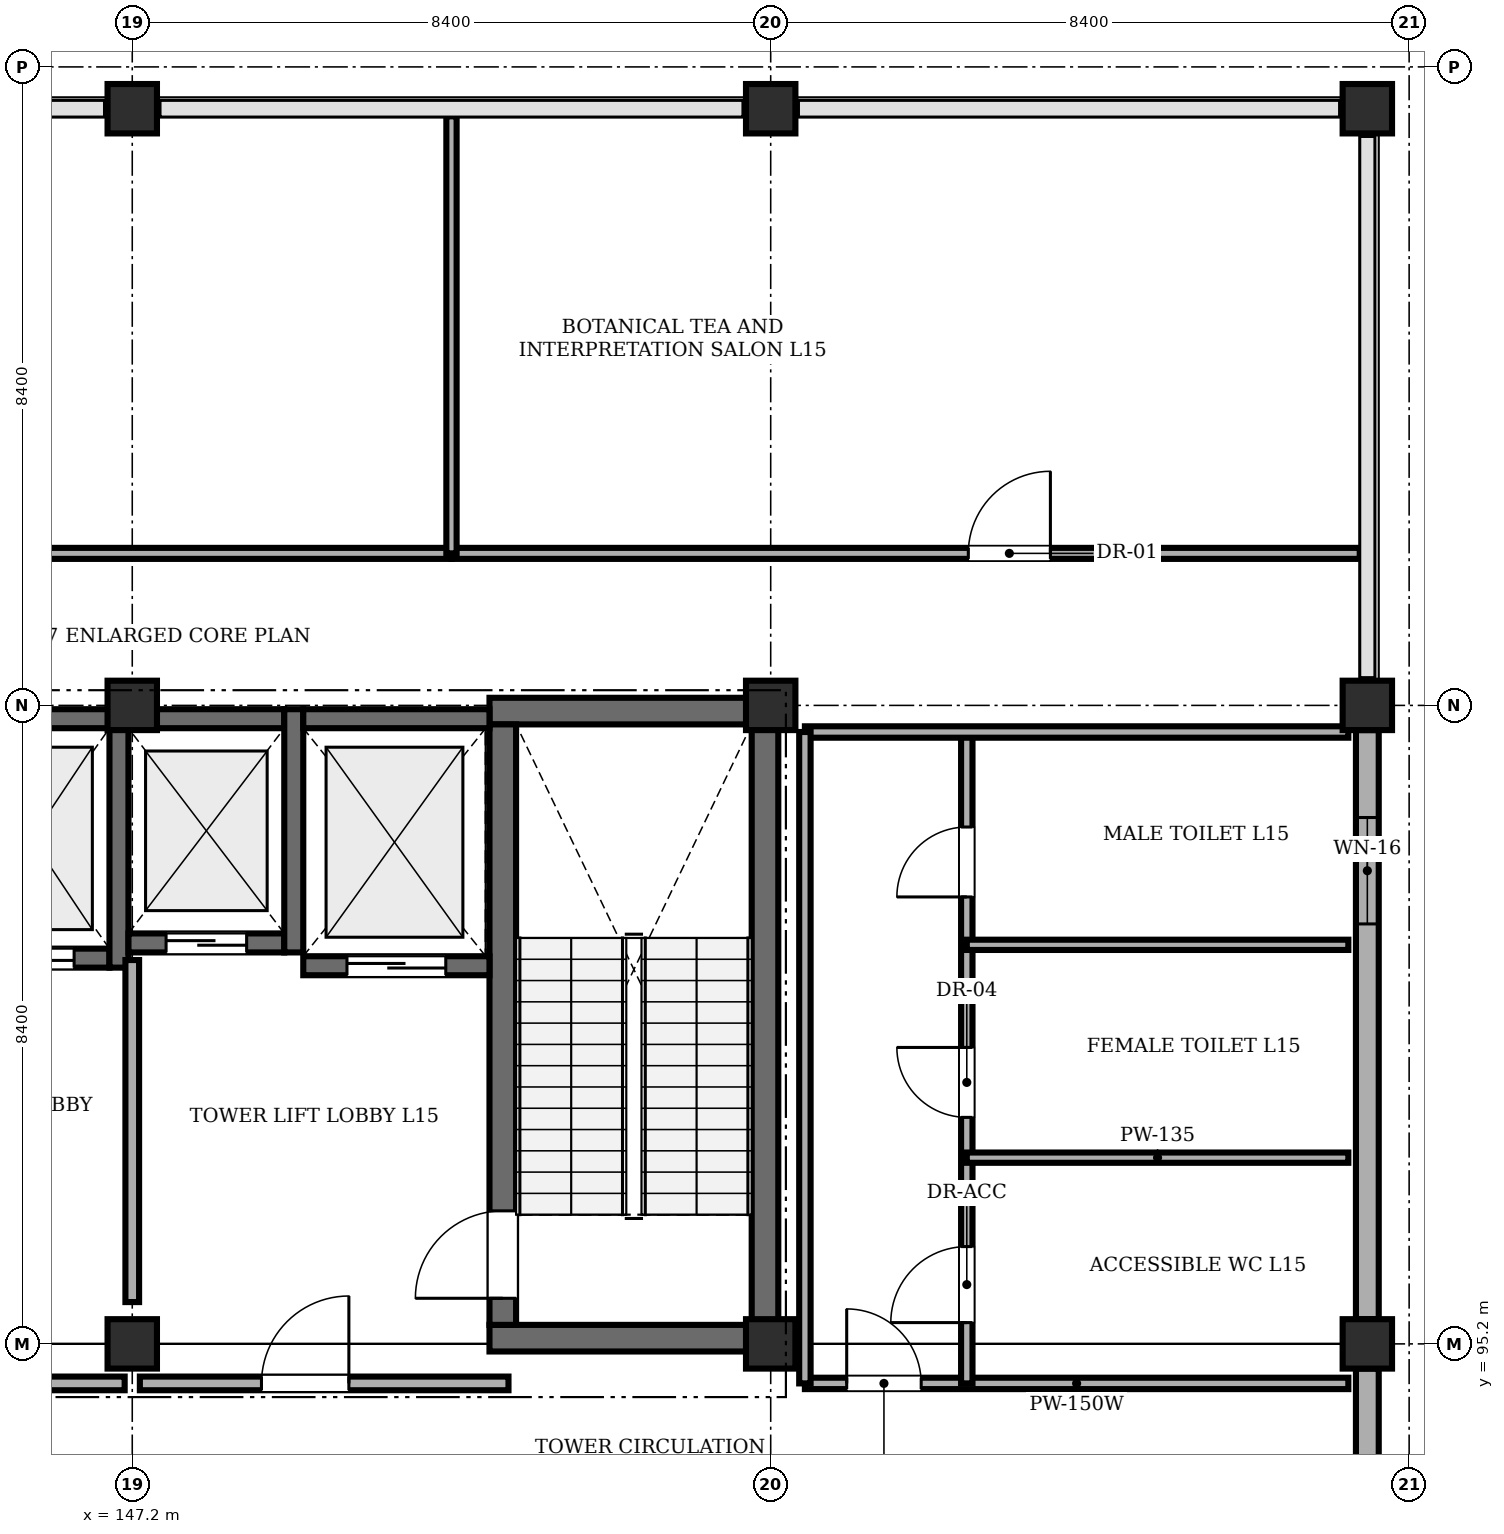
"""IFC4 building model, lengths in metres.
Left out: names, types, materials, properties, quantities, classifications, styles, units other than length and angle.
Written with IfcOpenShell. Run it as: python <this file> out.ifc"""

import sys

from ifc_helpers import new_model, si_unit, direction, frame, frame_2d, origin, origin_2d, place, context, subcontext, project, spatial, rectangle, extrude, element, fill, save


model = new_model("IFC4")
c1 = context("Model", 3, precision=1e-05, world=origin(), true_north=direction((0.0, 1.0)))
c2 = subcontext(c1, "Body", "Model", "MODEL_VIEW")
j1 = project(units=[si_unit("LENGTHUNIT", "METRE"), si_unit("PLANEANGLEUNIT", "RADIAN")], contexts=[c1])
p1 = place(None, origin())
s1 = spatial("IfcSite", under=j1, at=p1, CompositionType="ELEMENT")
p2 = place(p1, origin())
s2 = spatial("IfcBuilding", under=s1, at=p2, CompositionType="ELEMENT")
p3 = place(p2, frame((0.0, 0.0, 61.2)))
s3 = spatial("IfcBuildingStorey", under=s2, at=p3, CompositionType="ELEMENT", Elevation=61.2)
for number, where, z_axis, x_axis in (
    (1, (147.2, 95.2, 0.0), (0.0, 0.0, 1.0), (1.0, 0.0, 0.0)),
    (2, (147.2, 103.6, 0.0), (0.0, 0.0, 1.0), (1.0, 0.0, 0.0)),
    (3, (147.2, 111.45, 0.0), (0.0, 0.0, 1.0), (1.0, 0.0, 0.0)),
    (4, (155.6, 95.2, 0.0), (0.0, 0.0, 1.0), (1.0, 0.0, 0.0)),
    (5, (155.6, 103.6, 0.0), (0.0, 0.0, 1.0), (1.0, 0.0, 0.0)),
    (6, (155.6, 111.45, 0.0), (0.0, 0.0, 1.0), (1.0, 0.0, 0.0)),
    (7, (163.45, 95.2, 0.0), (0.0, 0.0, 1.0), (1.0, 0.0, 0.0)),
    (8, (163.45, 103.6, 0.0), (0.0, 0.0, 1.0), (1.0, 0.0, 0.0)),
    (9, (163.45, 111.45, 0.0), (0.0, 0.0, 1.0), (1.0, 0.0, 0.0)),
):
    element("IfcColumn", number, at=place(p3, frame(where, z_axis=z_axis, x_axis=x_axis)), inside=s3, PredefinedType="COLUMN", context=c2, shape_type="SweptSolid", body=[
        extrude(rectangle(XDim=0.65, YDim=0.65, at=origin_2d()), origin(), (0.0, 0.0, 1.0), 4.28),
    ])
for number, where, z_axis, x_axis in (
    (10, (151.9, 95.275, 0.0), (0.0, 0.0, 1.0), (1.0, 0.0, 0.0)),
    (11, (151.9, 103.525, 0.0), (0.0, 0.0, 1.0), (1.0, 0.0, 0.0)),
):
    element("IfcWall", number, at=place(p3, frame(where, z_axis=z_axis, x_axis=x_axis)), inside=s3, PredefinedType="SHEAR", context=c2, shape_type="SweptSolid", body=[
        extrude(rectangle(XDim=3.8, YDim=0.35, at=frame_2d((1.9, 0.0))), origin(), (0.0, 0.0, 1.0), 4.28),
    ])
p4 = place(p3, frame((152.075, 95.45, 0.0), z_axis=(0.0, 0.0, 1.0), x_axis=(0.0, 1.0, 0.0)))
e12 = element("IfcWall", 12, at=p4, inside=s3, PredefinedType="SHEAR", context=c2, shape_type="SweptSolid", body=[
    extrude(rectangle(XDim=7.9, YDim=0.35, at=frame_2d((3.95, 0.0))), origin(), (0.0, 0.0, 1.0), 4.28),
])
p5 = place(p4, frame((0.35, 0.0, 0.0)))
e13 = element("IfcOpeningElement", 13, at=p5, cuts=e12, PredefinedType="OPENING", context=c2, shape_type="SweptSolid", body=[
    extrude(rectangle(XDim=1.15, YDim=2.15, at=frame_2d((0.575, 1.075))), frame((0.0, 0.185, 0.0), z_axis=(0.0, -1.0, 0.0), x_axis=(1.0, 0.0, 0.0)), (0.0, 0.0, 1.0), 0.37),
])
p6 = place(p3, frame((155.525, 95.45, 0.0), z_axis=(0.0, 0.0, 1.0), x_axis=(0.0, 1.0, 0.0)))
e14 = element("IfcWall", 14, at=p6, inside=s3, PredefinedType="SHEAR", context=c2, shape_type="SweptSolid", body=[
    extrude(rectangle(XDim=7.9, YDim=0.35, at=frame_2d((3.95, 0.0))), origin(), (0.0, 0.0, 1.0), 4.28),
])
p7 = place(p3, frame((144.85, 100.275, 0.0), z_axis=(0.0, 0.0, 1.0), x_axis=(1.0, 0.0, 0.0)))
e15 = element("IfcWall", 15, at=p7, inside=s3, PredefinedType="SHEAR", context=c2, shape_type="SweptSolid", body=[
    extrude(rectangle(XDim=2.05, YDim=0.25, at=frame_2d((1.025, 0.0))), origin(), (0.0, 0.0, 1.0), 4.28),
])
p8 = place(p7, frame((0.465, 0.0, 0.0)))
e16 = element("IfcOpeningElement", 16, at=p8, cuts=e15, PredefinedType="OPENING", context=c2, shape_type="SweptSolid", body=[
    extrude(rectangle(XDim=1.12, YDim=2.15, at=frame_2d((0.56, 1.075))), frame((0.0, 0.135, 0.0), z_axis=(0.0, -1.0, 0.0), x_axis=(1.0, 0.0, 0.0)), (0.0, 0.0, 1.0), 0.27),
])
p9 = place(p3, frame((144.85, 103.425, 0.0), z_axis=(0.0, 0.0, 1.0), x_axis=(1.0, 0.0, 0.0)))
e17 = element("IfcWall", 17, at=p9, inside=s3, PredefinedType="SHEAR", context=c2, shape_type="SweptSolid", body=[
    extrude(rectangle(XDim=2.05, YDim=0.25, at=frame_2d((1.025, 0.0))), origin(), (0.0, 0.0, 1.0), 4.28),
])
p10 = place(p3, frame((147.025, 100.15, 0.0), z_axis=(0.0, 0.0, 1.0), x_axis=(0.0, 1.0, 0.0)))
e18 = element("IfcWall", 18, at=p10, inside=s3, PredefinedType="SHEAR", context=c2, shape_type="SweptSolid", body=[
    extrude(rectangle(XDim=3.4, YDim=0.25, at=frame_2d((1.7, 0.0))), origin(), (0.0, 0.0, 1.0), 4.28),
])
p11 = place(p3, frame((147.15, 100.475, 0.0), z_axis=(0.0, 0.0, 1.0), x_axis=(1.0, 0.0, 0.0)))
e19 = element("IfcWall", 19, at=p11, inside=s3, PredefinedType="SHEAR", context=c2, shape_type="SweptSolid", body=[
    extrude(rectangle(XDim=2.05, YDim=0.25, at=frame_2d((1.025, 0.0))), origin(), (0.0, 0.0, 1.0), 4.28),
])
p12 = place(p11, frame((0.495, 0.0, 0.0)))
e20 = element("IfcOpeningElement", 20, at=p12, cuts=e19, PredefinedType="OPENING", context=c2, shape_type="SweptSolid", body=[
    extrude(rectangle(XDim=1.06, YDim=2.15, at=frame_2d((0.53, 1.075))), frame((0.0, 0.135, 0.0), z_axis=(0.0, -1.0, 0.0), x_axis=(1.0, 0.0, 0.0)), (0.0, 0.0, 1.0), 0.27),
])
p13 = place(p3, frame((147.15, 103.425, 0.0), z_axis=(0.0, 0.0, 1.0), x_axis=(1.0, 0.0, 0.0)))
e21 = element("IfcWall", 21, at=p13, inside=s3, PredefinedType="SHEAR", context=c2, shape_type="SweptSolid", body=[
    extrude(rectangle(XDim=2.05, YDim=0.25, at=frame_2d((1.025, 0.0))), origin(), (0.0, 0.0, 1.0), 4.28),
])
p14 = place(p3, frame((149.325, 100.35, 0.0), z_axis=(0.0, 0.0, 1.0), x_axis=(0.0, 1.0, 0.0)))
e22 = element("IfcWall", 22, at=p14, inside=s3, PredefinedType="SHEAR", context=c2, shape_type="SweptSolid", body=[
    extrude(rectangle(XDim=3.2, YDim=0.25, at=frame_2d((1.6, 0.0))), origin(), (0.0, 0.0, 1.0), 4.28),
])
p15 = place(p3, frame((149.45, 100.175, 0.0), z_axis=(0.0, 0.0, 1.0), x_axis=(1.0, 0.0, 0.0)))
e23 = element("IfcWall", 23, at=p15, inside=s3, PredefinedType="SHEAR", context=c2, shape_type="SweptSolid", body=[
    extrude(rectangle(XDim=2.45, YDim=0.25, at=frame_2d((1.225, 0.0))), origin(), (0.0, 0.0, 1.0), 4.28),
])
p16 = place(p15, frame((0.575, 0.0, 0.0)))
e24 = element("IfcOpeningElement", 24, at=p16, cuts=e23, PredefinedType="OPENING", context=c2, shape_type="SweptSolid", body=[
    extrude(rectangle(XDim=1.3, YDim=2.25, at=frame_2d((0.65, 1.125))), frame((0.0, 0.135, 0.0), z_axis=(0.0, -1.0, 0.0), x_axis=(1.0, 0.0, 0.0)), (0.0, 0.0, 1.0), 0.27),
])
p17 = place(p3, frame((149.45, 103.425, 0.0), z_axis=(0.0, 0.0, 1.0), x_axis=(1.0, 0.0, 0.0)))
e25 = element("IfcWall", 25, at=p17, inside=s3, PredefinedType="SHEAR", context=c2, shape_type="SweptSolid", body=[
    extrude(rectangle(XDim=2.45, YDim=0.25, at=frame_2d((1.225, 0.0))), origin(), (0.0, 0.0, 1.0), 4.28),
])
p18 = place(p3, frame((163.45, 94.875, 0.0), z_axis=(0.0, 0.0, 1.0), x_axis=(0.0, -1.0, 0.0)))
e26 = element("IfcWall", 26, at=p18, inside=s3, PredefinedType="STANDARD", context=c2, shape_type="SweptSolid", body=[
    extrude(rectangle(XDim=7.75, YDim=0.3, at=frame_2d((3.875, 0.0))), origin(), (0.0, 0.0, 1.0), 3.58),
])
p19 = place(p18, frame((4.2, 0.0, 1.1)))
e27 = element("IfcOpeningElement", 27, at=p19, cuts=e26, PredefinedType="OPENING", context=c2, shape_type="SweptSolid", body=[
    extrude(rectangle(XDim=1.8, YDim=1.8, at=frame_2d((0.9, 0.9))), frame((0.0, 0.16, 0.0), z_axis=(0.0, -1.0, 0.0), x_axis=(1.0, 0.0, 0.0)), (0.0, 0.0, 1.0), 0.32),
])
p20 = place(p3, frame((163.45, 103.275, 0.0), z_axis=(0.0, 0.0, 1.0), x_axis=(0.0, -1.0, 0.0)))
e28 = element("IfcWall", 28, at=p20, inside=s3, PredefinedType="STANDARD", context=c2, shape_type="SweptSolid", body=[
    extrude(rectangle(XDim=7.75, YDim=0.3, at=frame_2d((3.875, 0.0))), origin(), (0.0, 0.0, 1.0), 3.58),
])
p21 = place(p20, frame((1.15, 0.0, 1.1)))
e29 = element("IfcOpeningElement", 29, at=p21, cuts=e28, PredefinedType="OPENING", context=c2, shape_type="SweptSolid", body=[
    extrude(rectangle(XDim=1.4, YDim=1.4, at=frame_2d((0.7, 0.7))), frame((0.0, 0.16, 0.0), z_axis=(0.0, -1.0, 0.0), x_axis=(1.0, 0.0, 0.0)), (0.0, 0.0, 1.0), 0.32),
])
p22 = place(p3, frame((142.3, 94.68, 0.0), z_axis=(0.0, 0.0, 1.0), x_axis=(1.0, 0.0, 0.0)))
e30 = element("IfcWall", 30, at=p22, inside=s3, PredefinedType="STANDARD", context=c2, shape_type="SweptSolid", body=[
    extrude(rectangle(XDim=4.8, YDim=0.18, at=frame_2d((2.4, 0.0))), origin(), (0.0, 0.0, 1.0), 4.28),
])
p23 = place(p22, frame((1.6, 0.0, 0.0)))
e31 = element("IfcOpeningElement", 31, at=p23, cuts=e30, PredefinedType="OPENING", context=c2, shape_type="SweptSolid", body=[
    extrude(rectangle(XDim=1.15, YDim=2.15, at=frame_2d((0.575, 1.075))), frame((0.0, 0.1, 0.0), z_axis=(0.0, -1.0, 0.0), x_axis=(1.0, 0.0, 0.0)), (0.0, 0.0, 1.0), 0.2),
])
p24 = place(p3, frame((147.3, 94.68, 0.0), z_axis=(0.0, 0.0, 1.0), x_axis=(1.0, 0.0, 0.0)))
e32 = element("IfcWall", 32, at=p24, inside=s3, PredefinedType="STANDARD", context=c2, shape_type="SweptSolid", body=[
    extrude(rectangle(XDim=4.85, YDim=0.18, at=frame_2d((2.425, 0.0))), origin(), (0.0, 0.0, 1.0), 4.28),
])
p25 = place(p24, frame((1.6, 0.0, 0.0)))
e33 = element("IfcOpeningElement", 33, at=p25, cuts=e32, PredefinedType="OPENING", context=c2, shape_type="SweptSolid", body=[
    extrude(rectangle(XDim=1.15, YDim=2.15, at=frame_2d((0.575, 1.075))), frame((0.0, 0.1, 0.0), z_axis=(0.0, -1.0, 0.0), x_axis=(1.0, 0.0, 0.0)), (0.0, 0.0, 1.0), 0.2),
])
p26 = place(p3, frame((147.2, 95.75, 0.0), z_axis=(0.0, 0.0, 1.0), x_axis=(0.0, 1.0, 0.0)))
e34 = element("IfcWall", 34, at=p26, inside=s3, PredefinedType="STANDARD", context=c2, shape_type="SweptSolid", body=[
    extrude(rectangle(XDim=4.5, YDim=0.18, at=frame_2d((2.25, 0.0))), origin(), (0.0, 0.0, 1.0), 3.58),
])
p27 = place(p3, frame((156.05, 94.68, 0.0), z_axis=(0.0, 0.0, 1.0), x_axis=(1.0, 0.0, 0.0)))
e35 = element("IfcWall", 35, at=p27, inside=s3, PredefinedType="PARTITIONING", context=c2, shape_type="SweptSolid", body=[
    extrude(rectangle(XDim=7.15, YDim=0.15, at=frame_2d((3.575, 0.0))), origin(), (0.0, 0.0, 1.0), 4.28),
])
p28 = place(p27, frame((0.55, 0.0, 0.0)))
e36 = element("IfcOpeningElement", 36, at=p28, cuts=e35, PredefinedType="OPENING", context=c2, shape_type="SweptSolid", body=[
    extrude(rectangle(XDim=0.98, YDim=2.12, at=frame_2d((0.49, 1.06))), frame((0.0, 0.085, 0.0), z_axis=(0.0, -1.0, 0.0), x_axis=(1.0, 0.0, 0.0)), (0.0, 0.0, 1.0), 0.17),
])
p29 = place(p3, frame((158.18, 94.68, 0.0), z_axis=(0.0, 0.0, 1.0), x_axis=(0.0, 1.0, 0.0)))
e37 = element("IfcWall", 37, at=p29, inside=s3, PredefinedType="PARTITIONING", context=c2, shape_type="SweptSolid", body=[
    extrude(rectangle(XDim=8.57, YDim=0.15, at=frame_2d((4.285, 0.0))), origin(), (0.0, 0.0, 1.0), 4.28),
])
p30 = place(p29, frame((0.8, 0.0, 0.0)))
e38 = element("IfcOpeningElement", 38, at=p30, cuts=e37, PredefinedType="OPENING", context=c2, shape_type="SweptSolid", body=[
    extrude(rectangle(XDim=1.0, YDim=2.12, at=frame_2d((0.5, 1.06))), frame((0.0, 0.085, 0.0), z_axis=(0.0, -1.0, 0.0), x_axis=(1.0, 0.0, 0.0)), (0.0, 0.0, 1.0), 0.17),
])
p31 = place(p29, frame((3.5, 0.0, 0.0)))
e39 = element("IfcOpeningElement", 39, at=p31, cuts=e37, PredefinedType="OPENING", context=c2, shape_type="SweptSolid", body=[
    extrude(rectangle(XDim=0.92, YDim=2.1, at=frame_2d((0.46, 1.05))), frame((0.0, 0.085, 0.0), z_axis=(0.0, -1.0, 0.0), x_axis=(1.0, 0.0, 0.0)), (0.0, 0.0, 1.0), 0.17),
])
p32 = place(p29, frame((6.4, 0.0, 0.0)))
e40 = element("IfcOpeningElement", 40, at=p32, cuts=e37, PredefinedType="OPENING", context=c2, shape_type="SweptSolid", body=[
    extrude(rectangle(XDim=0.92, YDim=2.1, at=frame_2d((0.46, 1.05))), frame((0.0, 0.085, 0.0), z_axis=(0.0, -1.0, 0.0), x_axis=(1.0, 0.0, 0.0)), (0.0, 0.0, 1.0), 0.17),
])
for number, where, z_axis, x_axis in (
    (41, (158.18, 97.65, 0.0), (0.0, 0.0, 1.0), (1.0, 0.0, 0.0)),
    (42, (158.18, 100.45, 0.0), (0.0, 0.0, 1.0), (1.0, 0.0, 0.0)),
):
    element("IfcWall", number, at=place(p3, frame(where, z_axis=z_axis, x_axis=x_axis)), inside=s3, PredefinedType="PARTITIONING", context=c2, shape_type="SweptSolid", body=[
        extrude(rectangle(XDim=5.02, YDim=0.135, at=frame_2d((2.51, 0.0))), origin(), (0.0, 0.0, 1.0), 4.28),
    ])
p33 = place(p3, frame((156.05, 103.25, 0.0), z_axis=(0.0, 0.0, 1.0), x_axis=(1.0, 0.0, 0.0)))
e43 = element("IfcWall", 43, at=p33, inside=s3, PredefinedType="PARTITIONING", context=c2, shape_type="SweptSolid", body=[
    extrude(rectangle(XDim=7.15, YDim=0.15, at=frame_2d((3.575, 0.0))), origin(), (0.0, 0.0, 1.0), 4.28),
])
p34 = place(p3, frame((156.05, 94.68, 0.0), z_axis=(0.0, 0.0, 1.0), x_axis=(0.0, 1.0, 0.0)))
e44 = element("IfcWall", 44, at=p34, inside=s3, PredefinedType="PARTITIONING", context=c2, shape_type="SweptSolid", body=[
    extrude(rectangle(XDim=8.57, YDim=0.15, at=frame_2d((4.285, 0.0))), origin(), (0.0, 0.0, 1.0), 4.28),
])
p35 = place(p3, frame((122.15, 105.6, 0.0), z_axis=(0.0, 0.0, 1.0), x_axis=(1.0, 0.0, 0.0)))
e45 = element("IfcWall", 45, at=p35, inside=s3, PredefinedType="PARTITIONING", context=c2, shape_type="SweptSolid", body=[
    extrude(rectangle(XDim=29.25, YDim=0.145, at=frame_2d((14.625, 0.0))), origin(), (0.0, 0.0, 1.0), 4.28),
])
p36 = place(p35, frame((3.75, 0.0, 0.0)))
e46 = element("IfcOpeningElement", 46, at=p36, cuts=e45, PredefinedType="OPENING", context=c2, shape_type="SweptSolid", body=[
    extrude(rectangle(XDim=1.92, YDim=2.28, at=frame_2d((0.96, 1.14))), frame((0.0, 0.083, 0.0), z_axis=(0.0, -1.0, 0.0), x_axis=(1.0, 0.0, 0.0)), (0.0, 0.0, 1.0), 0.165),
])
p37 = place(p3, frame((151.4, 105.6, 0.0), z_axis=(0.0, 0.0, 1.0), x_axis=(1.0, 0.0, 0.0)))
e47 = element("IfcWall", 47, at=p37, inside=s3, PredefinedType="PARTITIONING", context=c2, shape_type="SweptSolid", body=[
    extrude(rectangle(XDim=11.95, YDim=0.145, at=frame_2d((5.975, 0.0))), origin(), (0.0, 0.0, 1.0), 4.28),
])
p38 = place(p37, frame((6.8, 0.0, 0.0)))
e48 = element("IfcOpeningElement", 48, at=p38, cuts=e47, PredefinedType="OPENING", context=c2, shape_type="SweptSolid", body=[
    extrude(rectangle(XDim=1.08, YDim=2.15, at=frame_2d((0.54, 1.075))), frame((0.0, 0.083, 0.0), z_axis=(0.0, -1.0, 0.0), x_axis=(1.0, 0.0, 0.0)), (0.0, 0.0, 1.0), 0.165),
])
p39 = place(p3, frame((151.4, 105.6, 0.0), z_axis=(0.0, 0.0, 1.0), x_axis=(0.0, 1.0, 0.0)))
e49 = element("IfcWall", 49, at=p39, inside=s3, PredefinedType="PARTITIONING", context=c2, shape_type="SweptSolid", body=[
    extrude(rectangle(XDim=5.75, YDim=0.135, at=frame_2d((2.875, 0.0))), origin(), (0.0, 0.0, 1.0), 3.83),
])
p40 = place(p21, origin())
e50 = element("IfcWindow", 50, at=p40, inside=s3, PartitioningType="SINGLE_PANEL", PredefinedType="WINDOW", context=c2, shape_type="SweptSolid", body=[
    extrude(rectangle(XDim=1.4, YDim=1.4, at=frame_2d((0.7, 0.7))), frame((0.0, 0.03, 0.0), z_axis=(0.0, -1.0, 0.0), x_axis=(1.0, 0.0, 0.0)), (0.0, 0.0, 1.0), 0.06),
])
fill(e29, e50)
p41 = place(p25, origin())
e51 = element("IfcDoor", 51, at=p41, inside=s3, OperationType="SINGLE_SWING_RIGHT", PredefinedType="DOOR", context=c2, shape_type="SweptSolid", body=[
    extrude(rectangle(XDim=1.15, YDim=2.15, at=frame_2d((0.575, 1.075))), frame((0.0, 0.025, 0.0), z_axis=(0.0, -1.0, 0.0), x_axis=(1.0, 0.0, 0.0)), (0.0, 0.0, 1.0), 0.05),
])
fill(e33, e51)
p42 = place(p28, origin())
e52 = element("IfcDoor", 52, at=p42, inside=s3, OperationType="SINGLE_SWING_LEFT", PredefinedType="DOOR", context=c2, shape_type="SweptSolid", body=[
    extrude(rectangle(XDim=0.98, YDim=2.12, at=frame_2d((0.49, 1.06))), frame((0.0, 0.025, 0.0), z_axis=(0.0, -1.0, 0.0), x_axis=(1.0, 0.0, 0.0)), (0.0, 0.0, 1.0), 0.05),
])
fill(e36, e52)
p43 = place(p30, origin())
e53 = element("IfcDoor", 53, at=p43, inside=s3, OperationType="SINGLE_SWING_LEFT", PredefinedType="DOOR", context=c2, shape_type="SweptSolid", body=[
    extrude(rectangle(XDim=1.0, YDim=2.12, at=frame_2d((0.5, 1.06))), frame((0.0, 0.025, 0.0), z_axis=(0.0, -1.0, 0.0), x_axis=(1.0, 0.0, 0.0)), (0.0, 0.0, 1.0), 0.05),
])
fill(e38, e53)
p44 = place(p31, origin())
e54 = element("IfcDoor", 54, at=p44, inside=s3, OperationType="SINGLE_SWING_RIGHT", PredefinedType="DOOR", context=c2, shape_type="SweptSolid", body=[
    extrude(rectangle(XDim=0.92, YDim=2.1, at=frame_2d((0.46, 1.05))), frame((0.0, 0.025, 0.0), z_axis=(0.0, -1.0, 0.0), x_axis=(1.0, 0.0, 0.0)), (0.0, 0.0, 1.0), 0.05),
])
fill(e39, e54)
p45 = place(p32, origin())
e55 = element("IfcDoor", 55, at=p45, inside=s3, OperationType="SINGLE_SWING_LEFT", PredefinedType="DOOR", context=c2, shape_type="SweptSolid", body=[
    extrude(rectangle(XDim=0.92, YDim=2.1, at=frame_2d((0.46, 1.05))), frame((0.0, 0.025, 0.0), z_axis=(0.0, -1.0, 0.0), x_axis=(1.0, 0.0, 0.0)), (0.0, 0.0, 1.0), 0.05),
])
fill(e40, e55)
p46 = place(p38, origin())
e56 = element("IfcDoor", 56, at=p46, inside=s3, OperationType="SINGLE_SWING_RIGHT", PredefinedType="DOOR", context=c2, shape_type="SweptSolid", body=[
    extrude(rectangle(XDim=1.08, YDim=2.15, at=frame_2d((0.54, 1.075))), frame((0.0, 0.025, 0.0), z_axis=(0.0, -1.0, 0.0), x_axis=(1.0, 0.0, 0.0)), (0.0, 0.0, 1.0), 0.05),
])
fill(e48, e56)
p47 = place(p5, origin())
e57 = element("IfcDoor", 57, at=p47, inside=s3, OperationType="SINGLE_SWING_LEFT", PredefinedType="DOOR", context=c2, shape_type="SweptSolid", body=[
    extrude(rectangle(XDim=1.15, YDim=2.15, at=frame_2d((0.575, 1.075))), frame((0.0, 0.025, 0.0), z_axis=(0.0, -1.0, 0.0), x_axis=(1.0, 0.0, 0.0)), (0.0, 0.0, 1.0), 0.05),
])
fill(e13, e57)
p48 = place(p8, origin())
e58 = element("IfcDoor", 58, at=p48, inside=s3, OperationType="SLIDING_TO_LEFT", PredefinedType="DOOR", context=c2, shape_type="SweptSolid", body=[
    extrude(rectangle(XDim=1.12, YDim=2.15, at=frame_2d((0.56, 1.075))), frame((0.0, 0.025, 0.0), z_axis=(0.0, -1.0, 0.0), x_axis=(1.0, 0.0, 0.0)), (0.0, 0.0, 1.0), 0.05),
])
fill(e16, e58)
p49 = place(p12, origin())
e59 = element("IfcDoor", 59, at=p49, inside=s3, OperationType="SLIDING_TO_LEFT", PredefinedType="DOOR", context=c2, shape_type="SweptSolid", body=[
    extrude(rectangle(XDim=1.06, YDim=2.15, at=frame_2d((0.53, 1.075))), frame((0.0, 0.025, 0.0), z_axis=(0.0, -1.0, 0.0), x_axis=(1.0, 0.0, 0.0)), (0.0, 0.0, 1.0), 0.05),
])
fill(e20, e59)
p50 = place(p16, origin())
e60 = element("IfcDoor", 60, at=p50, inside=s3, OperationType="SLIDING_TO_LEFT", PredefinedType="DOOR", context=c2, shape_type="SweptSolid", body=[
    extrude(rectangle(XDim=1.3, YDim=2.25, at=frame_2d((0.65, 1.125))), frame((0.0, 0.025, 0.0), z_axis=(0.0, -1.0, 0.0), x_axis=(1.0, 0.0, 0.0)), (0.0, 0.0, 1.0), 0.05),
])
fill(e24, e60)
save(model, sys.argv[1])
